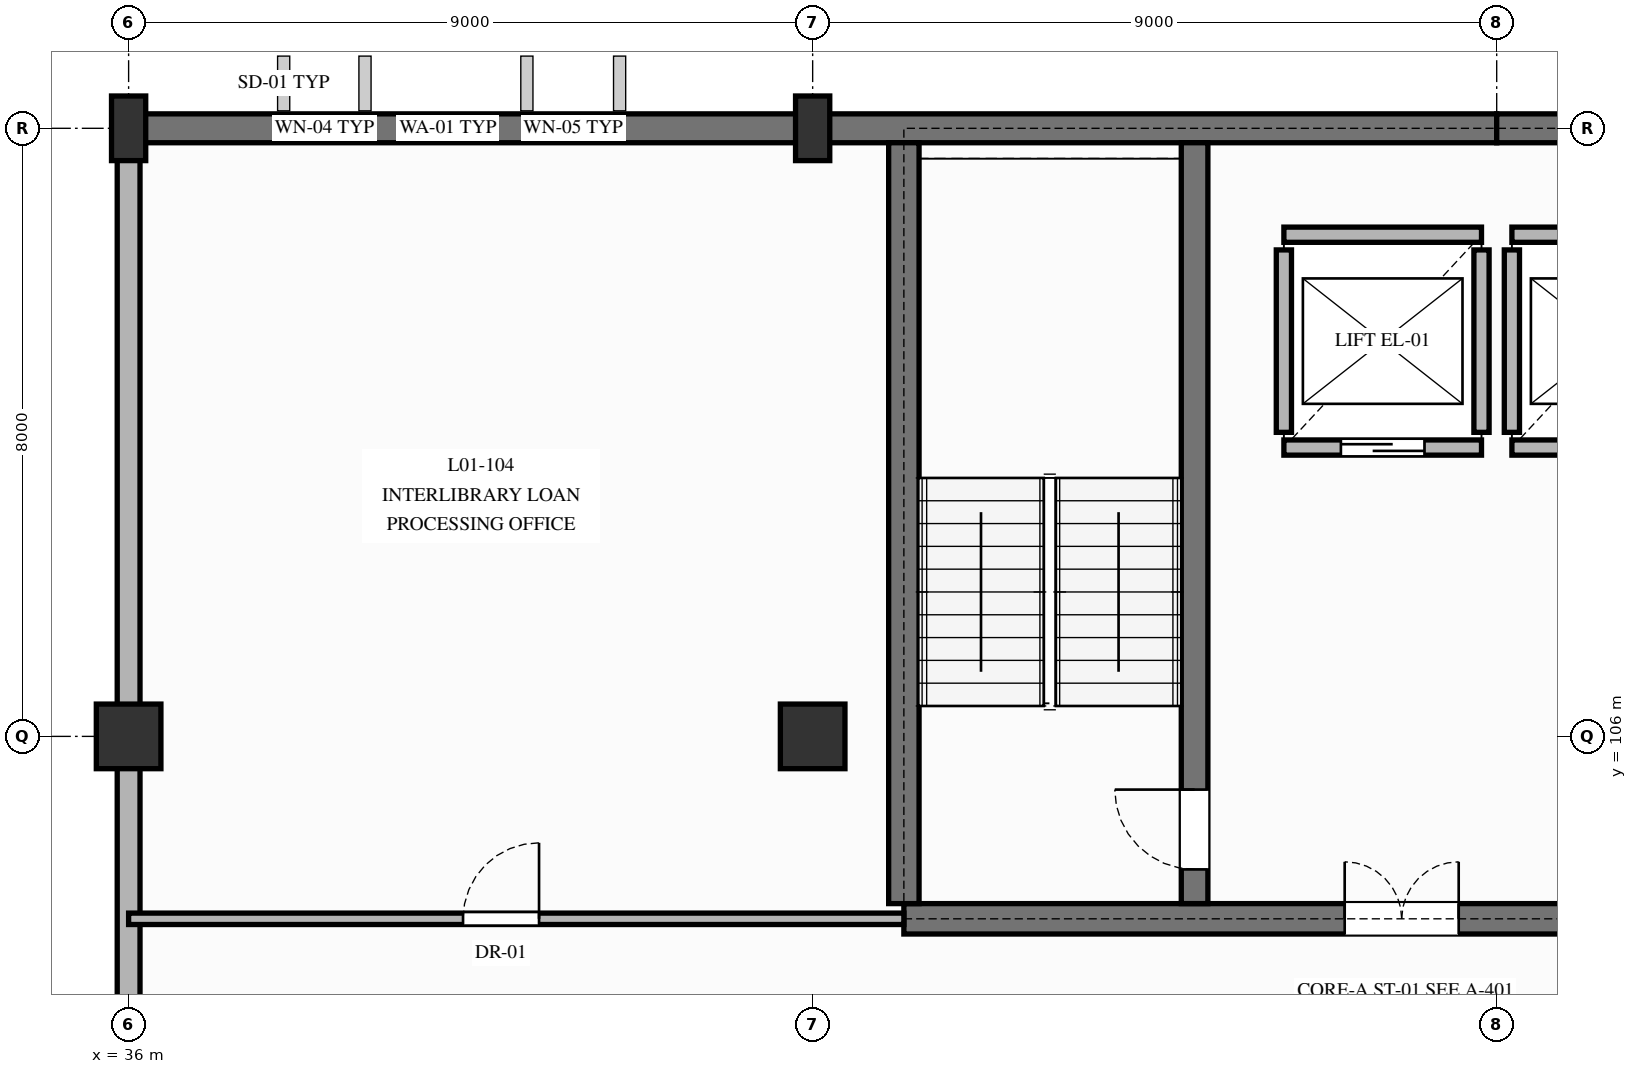
"""IFC4 building model, lengths in metres.
Left out: names, types, materials, properties, quantities, classifications, styles, units other than length and angle.
Written with IfcOpenShell. Run it as: python <this file> out.ifc"""

import sys

from ifc_helpers import new_model, si_unit, direction, frame, frame_2d, origin, origin_2d, place, context, subcontext, project, spatial, rectangle, extrude, element, fill, save


model = new_model("IFC4")
c1 = context("Model", 3, precision=1e-05, world=origin(), true_north=direction((0.0, 1.0)))
c2 = subcontext(c1, "Body", "Model", "MODEL_VIEW")
j1 = project(units=[si_unit("LENGTHUNIT", "METRE"), si_unit("PLANEANGLEUNIT", "RADIAN")], contexts=[c1])
p1 = place(None, origin())
s1 = spatial("IfcSite", under=j1, at=p1, CompositionType="ELEMENT")
p2 = place(p1, origin())
s2 = spatial("IfcBuilding", under=s1, at=p2, CompositionType="ELEMENT")
p3 = place(p2, frame((0.0, 0.0, 5.1)))
s3 = spatial("IfcBuildingStorey", under=s2, at=p3, CompositionType="ELEMENT", Elevation=5.1)
p4 = place(p3, frame((36.0, 106.0, 0.0), z_axis=(0.0, 0.0, 1.0), x_axis=(1.0, 0.0, 0.0)))
e1 = element("IfcColumn", 1, at=p4, inside=s3, PredefinedType="COLUMN", context=c2, shape_type="SweptSolid", body=[
    extrude(rectangle(XDim=0.85, YDim=0.85, at=origin_2d()), origin(), (0.0, 0.0, 1.0), 3.84),
])
p5 = place(p3, frame((36.0, 114.0, 0.0), z_axis=(0.0, 0.0, 1.0), x_axis=(0.0, 1.0, 0.0)))
e2 = element("IfcColumn", 2, at=p5, inside=s3, PredefinedType="COLUMN", context=c2, shape_type="SweptSolid", body=[
    extrude(rectangle(XDim=0.45, YDim=0.85, at=origin_2d()), origin(), (0.0, 0.0, 1.0), 3.84),
])
p6 = place(p3, frame((45.0, 106.0, 0.0), z_axis=(0.0, 0.0, 1.0), x_axis=(1.0, 0.0, 0.0)))
e3 = element("IfcColumn", 3, at=p6, inside=s3, PredefinedType="COLUMN", context=c2, shape_type="SweptSolid", body=[
    extrude(rectangle(XDim=0.85, YDim=0.85, at=origin_2d()), origin(), (0.0, 0.0, 1.0), 3.84),
])
p7 = place(p3, frame((45.0, 114.0, 0.0), z_axis=(0.0, 0.0, 1.0), x_axis=(0.0, 1.0, 0.0)))
e4 = element("IfcColumn", 4, at=p7, inside=s3, PredefinedType="COLUMN", context=c2, shape_type="SweptSolid", body=[
    extrude(rectangle(XDim=0.45, YDim=0.85, at=origin_2d()), origin(), (0.0, 0.0, 1.0), 3.84),
])
p8 = place(p3, frame((36.0, 114.0, 0.0), z_axis=(0.0, 0.0, 1.0), x_axis=(1.0, 0.0, 0.0)))
e5 = element("IfcWall", 5, at=p8, inside=s3, PredefinedType="SOLIDWALL", context=c2, shape_type="SweptSolid", body=[
    extrude(rectangle(XDim=9.0, YDim=0.38, at=frame_2d((4.5, 0.0))), origin(), (0.0, 0.0, 1.0), 3.55),
])
p9 = place(p8, frame((2.2, 0.0, 0.615)))
e6 = element("IfcOpeningElement", 6, at=p9, cuts=e5, PredefinedType="OPENING", context=c2, shape_type="SweptSolid", body=[
    extrude(rectangle(XDim=0.75, YDim=2.2, at=frame_2d((0.375, 1.1))), frame((0.0, 0.2, 0.0), z_axis=(0.0, -1.0, 0.0), x_axis=(1.0, 0.0, 0.0)), (0.0, 0.0, 1.0), 0.4),
])
p10 = place(p8, frame((5.4, 0.0, 0.615)))
e7 = element("IfcOpeningElement", 7, at=p10, cuts=e5, PredefinedType="OPENING", context=c2, shape_type="SweptSolid", body=[
    extrude(rectangle(XDim=0.9, YDim=2.2, at=frame_2d((0.45, 1.1))), frame((0.0, 0.2, 0.0), z_axis=(0.0, -1.0, 0.0), x_axis=(1.0, 0.0, 0.0)), (0.0, 0.0, 1.0), 0.4),
])
for number, where, z_axis, x_axis in (
    (8, (45.0, 114.0, 0.0), (0.0, 0.0, 1.0), (1.0, 0.0, 0.0)),
    (9, (54.0, 114.0, 0.0), (0.0, 0.0, 1.0), (1.0, 0.0, 0.0)),
):
    element("IfcWall", number, at=place(p3, frame(where, z_axis=z_axis, x_axis=x_axis)), inside=s3, PredefinedType="SOLIDWALL", context=c2, shape_type="SweptSolid", body=[
        extrude(rectangle(XDim=9.0, YDim=0.38, at=frame_2d((4.5, 0.0))), origin(), (0.0, 0.0, 1.0), 3.55),
    ])
p11 = place(p3, frame((36.0, 82.2, 0.0), z_axis=(0.0, 0.0, 1.0), x_axis=(0.0, 1.0, 0.0)))
e10 = element("IfcWall", 10, at=p11, inside=s3, PredefinedType="SOLIDWALL", context=c2, shape_type="SweptSolid", body=[
    extrude(rectangle(XDim=31.8, YDim=0.3, at=frame_2d((15.9, 0.0))), origin(), (0.0, 0.0, 1.0), 2.855),
])
p12 = place(p11, frame((3.0, 0.0, 0.885)))
e11 = element("IfcOpeningElement", 11, at=p12, cuts=e10, PredefinedType="OPENING", context=c2, shape_type="SweptSolid", body=[
    extrude(rectangle(XDim=1.35, YDim=1.85, at=frame_2d((0.675, 0.925))), frame((0.0, 0.16, 0.0), z_axis=(0.0, -1.0, 0.0), x_axis=(1.0, 0.0, 0.0)), (0.0, 0.0, 1.0), 0.32),
])
p13 = place(p11, frame((9.5, 0.0, 0.95)))
e12 = element("IfcOpeningElement", 12, at=p13, cuts=e10, PredefinedType="OPENING", context=c2, shape_type="SweptSolid", body=[
    extrude(rectangle(XDim=1.05, YDim=1.75, at=frame_2d((0.525, 0.875))), frame((0.0, 0.16, 0.0), z_axis=(0.0, -1.0, 0.0), x_axis=(1.0, 0.0, 0.0)), (0.0, 0.0, 1.0), 0.32),
])
p14 = place(p11, frame((16.5, 0.0, 0.635)))
e13 = element("IfcOpeningElement", 13, at=p14, cuts=e10, PredefinedType="OPENING", context=c2, shape_type="SweptSolid", body=[
    extrude(rectangle(XDim=1.5, YDim=2.1, at=frame_2d((0.75, 1.05))), frame((0.0, 0.16, 0.0), z_axis=(0.0, -1.0, 0.0), x_axis=(1.0, 0.0, 0.0)), (0.0, 0.0, 1.0), 0.32),
])
p15 = place(p3, frame((46.2, 103.6, 0.0), z_axis=(0.0, 0.0, 1.0), x_axis=(1.0, 0.0, 0.0)))
e14 = element("IfcWall", 14, at=p15, inside=s3, PredefinedType="SHEAR", context=c2, shape_type="SweptSolid", body=[
    extrude(rectangle(XDim=13.2, YDim=0.4, at=frame_2d((6.6, 0.0))), origin(), (0.0, 0.0, 1.0), 3.55),
])
p16 = place(p15, frame((5.8, 0.0, 0.0)))
e15 = element("IfcOpeningElement", 15, at=p16, cuts=e14, PredefinedType="OPENING", context=c2, shape_type="SweptSolid", body=[
    extrude(rectangle(XDim=1.5, YDim=2.2, at=frame_2d((0.75, 1.1))), frame((0.0, 0.21, 0.0), z_axis=(0.0, -1.0, 0.0), x_axis=(1.0, 0.0, 0.0)), (0.0, 0.0, 1.0), 0.42),
])
p17 = place(p3, frame((46.2, 103.8, 0.0), z_axis=(0.0, 0.0, 1.0), x_axis=(0.0, 1.0, 0.0)))
e16 = element("IfcWall", 16, at=p17, inside=s3, PredefinedType="SHEAR", context=c2, shape_type="SweptSolid", body=[
    extrude(rectangle(XDim=10.01, YDim=0.4, at=frame_2d((5.005, 0.0))), origin(), (0.0, 0.0, 1.0), 3.55),
])
p18 = place(p3, frame((50.025, 103.8, 0.0), z_axis=(0.0, 0.0, 1.0), x_axis=(0.0, 1.0, 0.0)))
e17 = element("IfcWall", 17, at=p18, inside=s3, PredefinedType="SHEAR", context=c2, shape_type="SweptSolid", body=[
    extrude(rectangle(XDim=10.01, YDim=0.35, at=frame_2d((5.005, 0.0))), origin(), (0.0, 0.0, 1.0), 3.55),
])
p19 = place(p18, frame((0.45, 0.0, 0.0)))
e18 = element("IfcOpeningElement", 18, at=p19, cuts=e17, PredefinedType="OPENING", context=c2, shape_type="SweptSolid", body=[
    extrude(rectangle(XDim=1.05, YDim=2.2, at=frame_2d((0.525, 1.1))), frame((0.0, 0.185, 0.0), z_axis=(0.0, -1.0, 0.0), x_axis=(1.0, 0.0, 0.0)), (0.0, 0.0, 1.0), 0.37),
])
p20 = place(p3, frame((51.2, 109.8, 0.0), z_axis=(0.0, 0.0, 1.0), x_axis=(1.0, 0.0, 0.0)))
e19 = element("IfcWall", 19, at=p20, inside=s3, PredefinedType="PARTITIONING", context=c2, shape_type="SweptSolid", body=[
    extrude(rectangle(XDim=2.6, YDim=0.2, at=frame_2d((1.3, 0.0))), origin(), (0.0, 0.0, 1.0), 3.55),
])
p21 = place(p20, frame((0.75, 0.0, 0.0)))
e20 = element("IfcOpeningElement", 20, at=p21, cuts=e19, PredefinedType="OPENING", context=c2, shape_type="SweptSolid", body=[
    extrude(rectangle(XDim=1.1, YDim=2.15, at=frame_2d((0.55, 1.075))), frame((0.0, 0.11, 0.0), z_axis=(0.0, -1.0, 0.0), x_axis=(1.0, 0.0, 0.0)), (0.0, 0.0, 1.0), 0.22),
])
p22 = place(p3, frame((51.2, 112.6, 0.0), z_axis=(0.0, 0.0, 1.0), x_axis=(1.0, 0.0, 0.0)))
e21 = element("IfcWall", 21, at=p22, inside=s3, PredefinedType="PARTITIONING", context=c2, shape_type="SweptSolid", body=[
    extrude(rectangle(XDim=2.6, YDim=0.2, at=frame_2d((1.3, 0.0))), origin(), (0.0, 0.0, 1.0), 3.55),
])
for number, where, z_axis, x_axis in (
    (22, (51.2, 110.0, 0.0), (0.0, 0.0, 1.0), (0.0, 1.0, 0.0)),
    (23, (53.8, 110.0, 0.0), (0.0, 0.0, 1.0), (0.0, 1.0, 0.0)),
):
    element("IfcWall", number, at=place(p3, frame(where, z_axis=z_axis, x_axis=x_axis)), inside=s3, PredefinedType="PARTITIONING", context=c2, shape_type="SweptSolid", body=[
        extrude(rectangle(XDim=2.4, YDim=0.2, at=frame_2d((1.2, 0.0))), origin(), (0.0, 0.0, 1.0), 3.55),
    ])
p23 = place(p3, frame((54.2, 109.8, 0.0), z_axis=(0.0, 0.0, 1.0), x_axis=(1.0, 0.0, 0.0)))
e24 = element("IfcWall", 24, at=p23, inside=s3, PredefinedType="PARTITIONING", context=c2, shape_type="SweptSolid", body=[
    extrude(rectangle(XDim=2.6, YDim=0.2, at=frame_2d((1.3, 0.0))), origin(), (0.0, 0.0, 1.0), 3.55),
])
p24 = place(p23, frame((0.75, 0.0, 0.0)))
e25 = element("IfcOpeningElement", 25, at=p24, cuts=e24, PredefinedType="OPENING", context=c2, shape_type="SweptSolid", body=[
    extrude(rectangle(XDim=1.1, YDim=2.15, at=frame_2d((0.55, 1.075))), frame((0.0, 0.11, 0.0), z_axis=(0.0, -1.0, 0.0), x_axis=(1.0, 0.0, 0.0)), (0.0, 0.0, 1.0), 0.22),
])
p25 = place(p3, frame((54.2, 112.6, 0.0), z_axis=(0.0, 0.0, 1.0), x_axis=(1.0, 0.0, 0.0)))
e26 = element("IfcWall", 26, at=p25, inside=s3, PredefinedType="PARTITIONING", context=c2, shape_type="SweptSolid", body=[
    extrude(rectangle(XDim=2.6, YDim=0.2, at=frame_2d((1.3, 0.0))), origin(), (0.0, 0.0, 1.0), 3.55),
])
p26 = place(p3, frame((54.2, 110.0, 0.0), z_axis=(0.0, 0.0, 1.0), x_axis=(0.0, 1.0, 0.0)))
e27 = element("IfcWall", 27, at=p26, inside=s3, PredefinedType="PARTITIONING", context=c2, shape_type="SweptSolid", body=[
    extrude(rectangle(XDim=2.4, YDim=0.2, at=frame_2d((1.2, 0.0))), origin(), (0.0, 0.0, 1.0), 3.55),
])
p27 = place(p3, frame((36.0, 103.6, 0.0), z_axis=(0.0, 0.0, 1.0), x_axis=(1.0, 0.0, 0.0)))
e28 = element("IfcWall", 28, at=p27, inside=s3, PredefinedType="PARTITIONING", context=c2, shape_type="SweptSolid", body=[
    extrude(rectangle(XDim=10.2, YDim=0.15, at=frame_2d((5.1, 0.0))), origin(), (0.0, 0.0, 1.0), 3.55),
])
p28 = place(p27, frame((4.4, 0.0, 0.0)))
e29 = element("IfcOpeningElement", 29, at=p28, cuts=e28, PredefinedType="OPENING", context=c2, shape_type="SweptSolid", body=[
    extrude(rectangle(XDim=1.0, YDim=2.15, at=frame_2d((0.5, 1.075))), frame((0.0, 0.085, 0.0), z_axis=(0.0, -1.0, 0.0), x_axis=(1.0, 0.0, 0.0)), (0.0, 0.0, 1.0), 0.17),
])
p29 = place(p9, origin())
e30 = element("IfcWindow", 30, at=p29, inside=s3, PartitioningType="SINGLE_PANEL", PredefinedType="WINDOW", context=c2, shape_type="SweptSolid", body=[
    extrude(rectangle(XDim=0.75, YDim=2.2, at=frame_2d((0.375, 1.1))), frame((0.0, 0.03, 0.0), z_axis=(0.0, -1.0, 0.0), x_axis=(1.0, 0.0, 0.0)), (0.0, 0.0, 1.0), 0.06),
])
fill(e6, e30)
p30 = place(p10, origin())
e31 = element("IfcWindow", 31, at=p30, inside=s3, PartitioningType="SINGLE_PANEL", PredefinedType="WINDOW", context=c2, shape_type="SweptSolid", body=[
    extrude(rectangle(XDim=0.9, YDim=2.2, at=frame_2d((0.45, 1.1))), frame((0.0, 0.03, 0.0), z_axis=(0.0, -1.0, 0.0), x_axis=(1.0, 0.0, 0.0)), (0.0, 0.0, 1.0), 0.06),
])
fill(e7, e31)
p31 = place(p16, origin())
e32 = element("IfcDoor", 32, at=p31, inside=s3, OperationType="DOUBLE_DOOR_SINGLE_SWING", PredefinedType="DOOR", context=c2, shape_type="SweptSolid", body=[
    extrude(rectangle(XDim=1.5, YDim=2.2, at=frame_2d((0.75, 1.1))), frame((0.0, 0.025, 0.0), z_axis=(0.0, -1.0, 0.0), x_axis=(1.0, 0.0, 0.0)), (0.0, 0.0, 1.0), 0.05),
])
fill(e15, e32)
p32 = place(p19, origin())
e33 = element("IfcDoor", 33, at=p32, inside=s3, OperationType="SINGLE_SWING_RIGHT", PredefinedType="DOOR", context=c2, shape_type="SweptSolid", body=[
    extrude(rectangle(XDim=1.05, YDim=2.2, at=frame_2d((0.525, 1.1))), frame((0.0, 0.025, 0.0), z_axis=(0.0, -1.0, 0.0), x_axis=(1.0, 0.0, 0.0)), (0.0, 0.0, 1.0), 0.05),
])
fill(e18, e33)
p33 = place(p21, origin())
e34 = element("IfcDoor", 34, at=p33, inside=s3, OperationType="SLIDING_TO_LEFT", PredefinedType="DOOR", context=c2, shape_type="SweptSolid", body=[
    extrude(rectangle(XDim=1.1, YDim=2.15, at=frame_2d((0.55, 1.075))), frame((0.0, 0.025, 0.0), z_axis=(0.0, -1.0, 0.0), x_axis=(1.0, 0.0, 0.0)), (0.0, 0.0, 1.0), 0.05),
])
fill(e20, e34)
p34 = place(p28, origin())
e35 = element("IfcDoor", 35, at=p34, inside=s3, OperationType="SINGLE_SWING_RIGHT", PredefinedType="DOOR", context=c2, shape_type="SweptSolid", body=[
    extrude(rectangle(XDim=1.0, YDim=2.15, at=frame_2d((0.5, 1.075))), frame((0.0, 0.025, 0.0), z_axis=(0.0, -1.0, 0.0), x_axis=(1.0, 0.0, 0.0)), (0.0, 0.0, 1.0), 0.05),
])
fill(e29, e35)
save(model, sys.argv[1])
